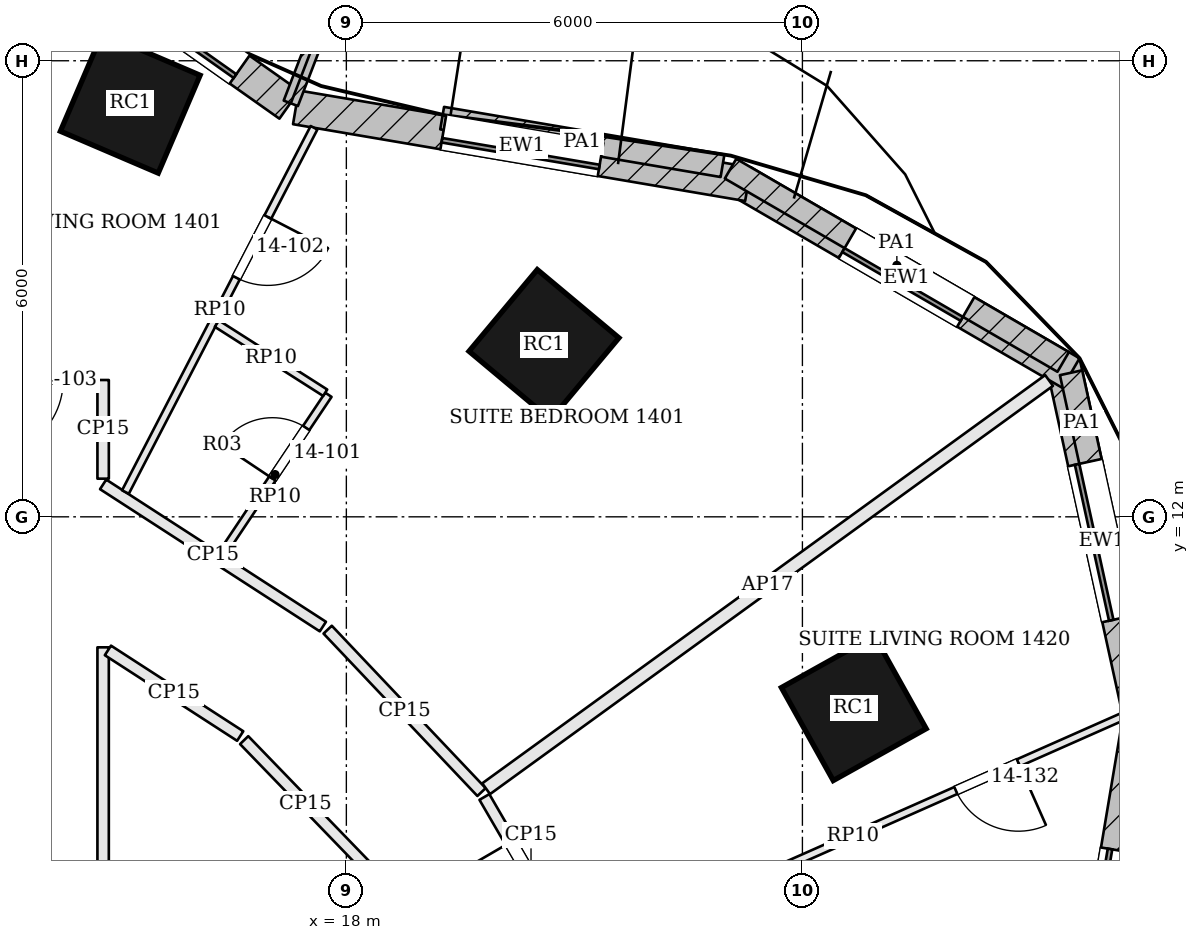
"""IFC4 building model, lengths in metres.
Left out: names, types, materials, properties, quantities, classifications, styles, units other than length and angle.
Written with IfcOpenShell. Run it as: python <this file> out.ifc"""

import sys

from ifc_helpers import new_model, si_unit, direction, frame, frame_2d, origin, origin_2d, place, context, subcontext, project, spatial, rectangle, extrude, element, fill, save


model = new_model("IFC4")
c1 = context("Model", 3, precision=1e-05, world=origin(), true_north=direction((0.0, 1.0)))
c2 = subcontext(c1, "Body", "Model", "MODEL_VIEW")
j1 = project(units=[si_unit("LENGTHUNIT", "METRE"), si_unit("PLANEANGLEUNIT", "RADIAN")], contexts=[c1])
p1 = place(None, origin())
s1 = spatial("IfcSite", under=j1, at=p1, CompositionType="ELEMENT")
p2 = place(p1, origin())
s2 = spatial("IfcBuilding", under=s1, at=p2, CompositionType="ELEMENT")
p3 = place(p2, frame((0.0, 0.0, 66.3)))
s3 = spatial("IfcBuildingStorey", under=s2, at=p3, CompositionType="ELEMENT", Elevation=66.3)
for number, where, z_axis, x_axis in (
    (1, (24.676, 9.483, 0.0), (0.0, 0.0, 1.0), (-0.487, 0.873, 0.0)),
    (2, (20.6, 14.266, 0.0), (0.0, 0.0, 1.0), (-0.767, 0.641, 0.0)),
    (3, (15.157, 17.441, 0.0), (0.0, 0.0, 1.0), (-0.919, 0.394, 0.0)),
):
    element("IfcColumn", number, at=place(p3, frame(where, z_axis=z_axis, x_axis=x_axis)), inside=s3, PredefinedType="COLUMN", context=c2, shape_type="SweptSolid", body=[
        extrude(rectangle(XDim=1.4, YDim=1.4, at=origin_2d()), origin(), (0.0, 0.0, 1.0), 3.6),
    ])
p4 = place(p3, frame((27.5, 3.732, 0.0), z_axis=(0.0, 0.0, 1.0), x_axis=(0.165174419367, 0.986264371853, 0.0)))
e4 = element("IfcWall", 4, at=p4, inside=s3, PredefinedType="SOLIDWALL", context=c2, shape_type="SweptSolid", body=[
    extrude(rectangle(XDim=5.769, YDim=0.45, at=frame_2d((2.885, 0.0))), origin(), (0.0, 0.0, 1.0), 3.4),
])
p5 = place(p4, frame((1.834, 0.0, 0.9)))
e5 = element("IfcOpeningElement", 5, at=p5, cuts=e4, PredefinedType="OPENING", context=c2, shape_type="SweptSolid", body=[
    extrude(rectangle(XDim=2.1, YDim=2.0, at=frame_2d((1.05, 1.0))), frame((0.0, 0.235, 0.0), z_axis=(0.0, -1.0, 0.0), x_axis=(1.0, 0.0, 0.0)), (0.0, 0.0, 1.0), 0.47),
])
p6 = place(p3, frame((28.456, 9.337, 0.0), z_axis=(0.0, 0.0, 1.0), x_axis=(-0.213878425795, 0.976860286315, 0.0)))
e6 = element("IfcWall", 6, at=p6, inside=s3, PredefinedType="SOLIDWALL", context=c2, shape_type="SweptSolid", body=[
    extrude(rectangle(XDim=4.812, YDim=0.45, at=frame_2d((2.406, 0.0))), origin(), (0.0, 0.0, 1.0), 3.4),
])
p7 = place(p6, frame((1.356, 0.0, 0.9)))
e7 = element("IfcOpeningElement", 7, at=p7, cuts=e6, PredefinedType="OPENING", context=c2, shape_type="SweptSolid", body=[
    extrude(rectangle(XDim=2.1, YDim=2.0, at=frame_2d((1.05, 1.0))), frame((0.0, 0.235, 0.0), z_axis=(0.0, -1.0, 0.0), x_axis=(1.0, 0.0, 0.0)), (0.0, 0.0, 1.0), 0.47),
])
p8 = place(p3, frame((27.533, 13.891, 0.0), z_axis=(0.0, 0.0, 1.0), x_axis=(-0.864657614938, 0.502361631625, 0.0)))
e8 = element("IfcWall", 8, at=p8, inside=s3, PredefinedType="SOLIDWALL", context=c2, shape_type="SweptSolid", body=[
    extrude(rectangle(XDim=5.001, YDim=0.45, at=frame_2d((2.5, 0.0))), origin(), (0.0, 0.0, 1.0), 3.4),
])
p9 = place(p8, frame((1.6, 0.0, 0.9)))
e9 = element("IfcOpeningElement", 9, at=p9, cuts=e8, PredefinedType="OPENING", context=c2, shape_type="SweptSolid", body=[
    extrude(rectangle(XDim=1.8, YDim=2.0, at=frame_2d((0.9, 1.0))), frame((0.0, 0.235, 0.0), z_axis=(0.0, -1.0, 0.0), x_axis=(1.0, 0.0, 0.0)), (0.0, 0.0, 1.0), 0.47),
])
p10 = place(p3, frame((23.284, 16.376, 0.0), z_axis=(0.0, 0.0, 1.0), x_axis=(-0.985861729428, 0.167560885797, 0.0)))
e10 = element("IfcWall", 10, at=p10, inside=s3, PredefinedType="SOLIDWALL", context=c2, shape_type="SweptSolid", body=[
    extrude(rectangle(XDim=6.033, YDim=0.45, at=frame_2d((3.017, 0.0))), origin(), (0.0, 0.0, 1.0), 3.4),
])
p11 = place(p10, frame((1.967, 0.0, 0.9)))
e11 = element("IfcOpeningElement", 11, at=p11, cuts=e10, PredefinedType="OPENING", context=c2, shape_type="SweptSolid", body=[
    extrude(rectangle(XDim=2.1, YDim=2.0, at=frame_2d((1.05, 1.0))), frame((0.0, 0.235, 0.0), z_axis=(0.0, -1.0, 0.0), x_axis=(1.0, 0.0, 0.0)), (0.0, 0.0, 1.0), 0.47),
])
p12 = place(p3, frame((17.249, 17.422, 0.0), z_axis=(0.0, 0.0, 1.0), x_axis=(-0.816589291225, 0.577219134694, 0.0)))
e12 = element("IfcWall", 12, at=p12, inside=s3, PredefinedType="SOLIDWALL", context=c2, shape_type="SweptSolid", body=[
    extrude(rectangle(XDim=3.701, YDim=0.45, at=frame_2d((1.851, 0.0))), origin(), (0.0, 0.0, 1.0), 3.4),
])
p13 = place(p12, frame((0.801, 0.0, 0.9)))
e13 = element("IfcOpeningElement", 13, at=p13, cuts=e12, PredefinedType="OPENING", context=c2, shape_type="SweptSolid", body=[
    extrude(rectangle(XDim=2.1, YDim=2.0, at=frame_2d((1.05, 1.0))), frame((0.0, 0.235, 0.0), z_axis=(0.0, -1.0, 0.0), x_axis=(1.0, 0.0, 0.0)), (0.0, 0.0, 1.0), 0.47),
])
p14 = place(p3, frame((17.269, 17.44, 0.0), z_axis=(0.0, 0.0, 1.0), x_axis=(0.359381039836, 0.933190906624, 0.0)))
e14 = element("IfcWall", 14, at=p14, inside=s3, PredefinedType="SOLIDWALL", context=c2, shape_type="SweptSolid", body=[
    extrude(rectangle(XDim=1.75, YDim=0.2, at=frame_2d((0.875, 0.0))), origin(), (0.0, 0.0, 1.0), 3.4),
])
p15 = place(p3, frame((27.823, 12.577, 3.6), z_axis=(0.0, 0.0, 1.0), x_axis=(-0.213826357694, 0.976871684898, 0.0)))
e15 = element("IfcWall", 15, at=p15, inside=s3, PredefinedType="PARAPET", context=c2, shape_type="SweptSolid", body=[
    extrude(rectangle(XDim=1.35, YDim=0.3, at=frame_2d((0.675, 0.0))), origin(), (0.0, 0.0, 1.0), 1.1),
])
p16 = place(p3, frame((27.431, 14.038, 3.6), z_axis=(0.0, 0.0, 1.0), x_axis=(-0.864664590165, 0.502349625773, 0.0)))
e16 = element("IfcWall", 16, at=p16, inside=s3, PredefinedType="PARAPET", context=c2, shape_type="SweptSolid", body=[
    extrude(rectangle(XDim=5.061, YDim=0.3, at=frame_2d((2.531, 0.0))), origin(), (0.0, 0.0, 1.0), 1.1),
])
p17 = place(p3, frame((22.949, 16.618, 3.6), z_axis=(0.0, 0.0, 1.0), x_axis=(-0.985859727788, 0.167572662229, 0.0)))
e17 = element("IfcWall", 17, at=p17, inside=s3, PredefinedType="PARAPET", context=c2, shape_type="SweptSolid", body=[
    extrude(rectangle(XDim=3.741, YDim=0.3, at=frame_2d((1.871, 0.0))), origin(), (0.0, 0.0, 1.0), 1.1),
])
p18 = place(p3, frame((19.778, 8.379, 0.0), z_axis=(0.0, 0.0, 1.0), x_axis=(-0.687769957484, 0.725928705578, 0.0)))
e18 = element("IfcWall", 18, at=p18, inside=s3, PredefinedType="PARTITIONING", context=c2, shape_type="SweptSolid", body=[
    extrude(rectangle(XDim=2.943, YDim=0.15, at=frame_2d((1.472, 0.0))), origin(), (0.0, 0.0, 1.0), 2.68),
])
p19 = place(p3, frame((17.691, 10.556, 0.0), z_axis=(0.0, 0.0, 1.0), x_axis=(-0.839564450265, 0.54326009779, 0.0)))
e19 = element("IfcWall", 19, at=p19, inside=s3, PredefinedType="PARTITIONING", context=c2, shape_type="SweptSolid", body=[
    extrude(rectangle(XDim=3.443, YDim=0.15, at=frame_2d((1.722, 0.0))), origin(), (0.0, 0.0, 1.0), 2.68),
])
p20 = place(p3, frame((14.8, 12.502, 0.0), z_axis=(0.0, 0.0, 1.0), x_axis=(-0.000188040613, 0.99999998232, 0.0)))
e20 = element("IfcWall", 20, at=p20, inside=s3, PredefinedType="PARTITIONING", context=c2, shape_type="SweptSolid", body=[
    extrude(rectangle(XDim=1.298, YDim=0.15, at=frame_2d((0.649, 0.0))), origin(), (0.0, 0.0, 1.0), 2.68),
])
p21 = place(p3, frame((14.725, 13.8, 0.0), z_axis=(0.0, 0.0, 1.0), x_axis=(-1.0, 0.0, 0.0)))
e21 = element("IfcWall", 21, at=p21, inside=s3, PredefinedType="PARTITIONING", context=c2, shape_type="SweptSolid", body=[
    extrude(rectangle(XDim=2.61, YDim=0.15, at=frame_2d((1.305, 0.0))), origin(), (0.0, 0.0, 1.0), 2.68),
])
p22 = place(p21, frame((0.45, 0.0, 0.0)))
e22 = element("IfcOpeningElement", 22, at=p22, cuts=e21, PredefinedType="OPENING", context=c2, shape_type="SweptSolid", body=[
    extrude(rectangle(XDim=1.0, YDim=2.1, at=frame_2d((0.5, 1.05))), frame((0.0, 0.085, 0.0), z_axis=(0.0, -1.0, 0.0), x_axis=(1.0, 0.0, 0.0)), (0.0, 0.0, 1.0), 0.17),
])
p23 = place(p3, frame((27.245, 13.794, 0.0), z_axis=(0.0, 0.0, 1.0), x_axis=(-0.809545443227, -0.58705721642, 0.0)))
e23 = element("IfcWall", 23, at=p23, inside=s3, PredefinedType="PARTITIONING", context=c2, shape_type="SweptSolid", body=[
    extrude(rectangle(XDim=9.148, YDim=0.175, at=frame_2d((4.574, 0.0))), origin(), (0.0, 0.0, 1.0), 2.68),
])
p24 = place(p3, frame((21.043, 6.202, 0.0), z_axis=(0.0, 0.0, 1.0), x_axis=(-0.502422412937, 0.864622298451, 0.0)))
e24 = element("IfcWall", 24, at=p24, inside=s3, PredefinedType="PARTITIONING", context=c2, shape_type="SweptSolid", body=[
    extrude(rectangle(XDim=2.443, YDim=0.15, at=frame_2d((1.221, 0.0))), origin(), (0.0, 0.0, 1.0), 2.68),
])
p25 = place(p24, frame((0.756, 0.0, 0.0)))
e25 = element("IfcOpeningElement", 25, at=p25, cuts=e24, PredefinedType="OPENING", context=c2, shape_type="SweptSolid", body=[
    extrude(rectangle(XDim=1.0, YDim=2.1, at=frame_2d((0.5, 1.05))), frame((0.0, 0.085, 0.0), z_axis=(0.0, -1.0, 0.0), x_axis=(1.0, 0.0, 0.0)), (0.0, 0.0, 1.0), 0.17),
])
p26 = place(p3, frame((14.8, -4.725, 0.0), z_axis=(0.0, 0.0, 1.0), x_axis=(0.0, 1.0, 0.0)))
e26 = element("IfcWall", 26, at=p26, inside=s3, PredefinedType="PARTITIONING", context=c2, shape_type="SweptSolid", body=[
    extrude(rectangle(XDim=15.008, YDim=0.15, at=frame_2d((7.504, 0.0))), origin(), (0.0, 0.0, 1.0), 2.68),
])
p27 = place(p26, frame((9.366, 0.0, 0.0)))
e27 = element("IfcOpeningElement", 27, at=p27, cuts=e26, PredefinedType="OPENING", context=c2, shape_type="SweptSolid", body=[
    extrude(rectangle(XDim=1.0, YDim=2.1, at=frame_2d((0.5, 1.05))), frame((0.0, 0.085, 0.0), z_axis=(0.0, -1.0, 0.0), x_axis=(1.0, 0.0, 0.0)), (0.0, 0.0, 1.0), 0.17),
])
p28 = place(p3, frame((14.863, 10.242, 0.0), z_axis=(0.0, 0.0, 1.0), x_axis=(0.839563837869, -0.543261044198, 0.0)))
e28 = element("IfcWall", 28, at=p28, inside=s3, PredefinedType="PARTITIONING", context=c2, shape_type="SweptSolid", body=[
    extrude(rectangle(XDim=2.073, YDim=0.15, at=frame_2d((1.037, 0.0))), origin(), (0.0, 0.0, 1.0), 2.68),
])
p29 = place(p3, frame((16.656, 9.062, 0.0), z_axis=(0.0, 0.0, 1.0), x_axis=(0.695225115827, -0.718792068906, 0.0)))
e29 = element("IfcWall", 29, at=p29, inside=s3, PredefinedType="PARTITIONING", context=c2, shape_type="SweptSolid", body=[
    extrude(rectangle(XDim=2.321, YDim=0.15, at=frame_2d((1.16, 0.0))), origin(), (0.0, 0.0, 1.0), 2.68),
])
p30 = place(p3, frame((17.575, 17.118, 0.0), z_axis=(0.0, 0.0, 1.0), x_axis=(-0.459763790059, -0.88804124755, 0.0)))
e30 = element("IfcWall", 30, at=p30, inside=s3, PredefinedType="PARTITIONING", context=c2, shape_type="SweptSolid", body=[
    extrude(rectangle(XDim=5.397, YDim=0.1, at=frame_2d((2.698, 0.0))), origin(), (0.0, 0.0, 1.0), 2.68),
])
p31 = place(p30, frame((1.322, 0.0, 0.0)))
e31 = element("IfcOpeningElement", 31, at=p31, cuts=e30, PredefinedType="OPENING", context=c2, shape_type="SweptSolid", body=[
    extrude(rectangle(XDim=0.9, YDim=2.4, at=frame_2d((0.45, 1.2))), frame((0.0, 0.06, 0.0), z_axis=(0.0, -1.0, 0.0), x_axis=(1.0, 0.0, 0.0)), (0.0, 0.0, 1.0), 0.12),
])
p32 = place(p3, frame((16.36, 11.507, 0.0), z_axis=(0.0, 0.0, 1.0), x_axis=(0.555949061639, 0.831216362245, 0.0)))
e32 = element("IfcWall", 32, at=p32, inside=s3, PredefinedType="PARTITIONING", context=c2, shape_type="SweptSolid", body=[
    extrude(rectangle(XDim=2.525, YDim=0.1, at=frame_2d((1.263, 0.0))), origin(), (0.0, 0.0, 1.0), 2.68),
])
p33 = place(p32, frame((1.2, 0.0, 0.0)))
e33 = element("IfcOpeningElement", 33, at=p33, cuts=e32, PredefinedType="OPENING", context=c2, shape_type="SweptSolid", body=[
    extrude(rectangle(XDim=0.8, YDim=2.1, at=frame_2d((0.4, 1.05))), frame((0.0, 0.06, 0.0), z_axis=(0.0, -1.0, 0.0), x_axis=(1.0, 0.0, 0.0)), (0.0, 0.0, 1.0), 0.12),
])
p34 = place(p3, frame((17.722, 13.633, 0.0), z_axis=(0.0, 0.0, 1.0), x_axis=(-0.84310195877, 0.537753742077, 0.0)))
e34 = element("IfcWall", 34, at=p34, inside=s3, PredefinedType="PARTITIONING", context=c2, shape_type="SweptSolid", body=[
    extrude(rectangle(XDim=1.69, YDim=0.1, at=frame_2d((0.845, 0.0))), origin(), (0.0, 0.0, 1.0), 2.68),
])
p35 = place(p3, frame((28.213, 9.371, 0.0), z_axis=(0.0, 0.0, 1.0), x_axis=(-0.914345064768, -0.404935923986, 0.0)))
e35 = element("IfcWall", 35, at=p35, inside=s3, PredefinedType="PARTITIONING", context=c2, shape_type="SweptSolid", body=[
    extrude(rectangle(XDim=7.763, YDim=0.1, at=frame_2d((3.882, 0.0))), origin(), (0.0, 0.0, 1.0), 2.68),
])
p36 = place(p35, frame((1.5, 0.0, 0.0)))
e36 = element("IfcOpeningElement", 36, at=p36, cuts=e35, PredefinedType="OPENING", context=c2, shape_type="SweptSolid", body=[
    extrude(rectangle(XDim=0.9, YDim=2.4, at=frame_2d((0.45, 1.2))), frame((0.0, 0.06, 0.0), z_axis=(0.0, -1.0, 0.0), x_axis=(1.0, 0.0, 0.0)), (0.0, 0.0, 1.0), 0.12),
])
p37 = place(p5, origin())
e37 = element("IfcWindow", 37, at=p37, inside=s3, PartitioningType="SINGLE_PANEL", PredefinedType="WINDOW", context=c2, shape_type="SweptSolid", body=[
    extrude(rectangle(XDim=2.1, YDim=2.0, at=frame_2d((1.05, 1.0))), frame((0.0, 0.135, 0.0), z_axis=(0.0, -1.0, 0.0), x_axis=(1.0, 0.0, 0.0)), (0.0, 0.0, 1.0), 0.06),
])
fill(e5, e37)
p38 = place(p7, origin())
e38 = element("IfcWindow", 38, at=p38, inside=s3, PartitioningType="SINGLE_PANEL", PredefinedType="WINDOW", context=c2, shape_type="SweptSolid", body=[
    extrude(rectangle(XDim=2.1, YDim=2.0, at=frame_2d((1.05, 1.0))), frame((0.0, 0.135, 0.0), z_axis=(0.0, -1.0, 0.0), x_axis=(1.0, 0.0, 0.0)), (0.0, 0.0, 1.0), 0.06),
])
fill(e7, e38)
p39 = place(p9, origin())
e39 = element("IfcWindow", 39, at=p39, inside=s3, PartitioningType="SINGLE_PANEL", PredefinedType="WINDOW", context=c2, shape_type="SweptSolid", body=[
    extrude(rectangle(XDim=1.8, YDim=2.0, at=frame_2d((0.9, 1.0))), frame((0.0, 0.135, 0.0), z_axis=(0.0, -1.0, 0.0), x_axis=(1.0, 0.0, 0.0)), (0.0, 0.0, 1.0), 0.06),
])
fill(e9, e39)
p40 = place(p11, origin())
e40 = element("IfcWindow", 40, at=p40, inside=s3, PartitioningType="SINGLE_PANEL", PredefinedType="WINDOW", context=c2, shape_type="SweptSolid", body=[
    extrude(rectangle(XDim=2.1, YDim=2.0, at=frame_2d((1.05, 1.0))), frame((0.0, 0.135, 0.0), z_axis=(0.0, -1.0, 0.0), x_axis=(1.0, 0.0, 0.0)), (0.0, 0.0, 1.0), 0.06),
])
fill(e11, e40)
p41 = place(p13, origin())
e41 = element("IfcWindow", 41, at=p41, inside=s3, PartitioningType="SINGLE_PANEL", PredefinedType="WINDOW", context=c2, shape_type="SweptSolid", body=[
    extrude(rectangle(XDim=2.1, YDim=2.0, at=frame_2d((1.05, 1.0))), frame((0.0, 0.135, 0.0), z_axis=(0.0, -1.0, 0.0), x_axis=(1.0, 0.0, 0.0)), (0.0, 0.0, 1.0), 0.06),
])
fill(e13, e41)
p42 = place(p33, origin())
e42 = element("IfcDoor", 42, at=p42, inside=s3, OperationType="SINGLE_SWING_LEFT", PredefinedType="DOOR", context=c2, shape_type="SweptSolid", body=[
    extrude(rectangle(XDim=0.8, YDim=2.1, at=frame_2d((0.4, 1.05))), frame((0.0, 0.025, 0.0), z_axis=(0.0, -1.0, 0.0), x_axis=(1.0, 0.0, 0.0)), (0.0, 0.0, 1.0), 0.05),
])
fill(e33, e42)
p43 = place(p31, origin())
e43 = element("IfcDoor", 43, at=p43, inside=s3, OperationType="SINGLE_SWING_LEFT", PredefinedType="DOOR", context=c2, shape_type="SweptSolid", body=[
    extrude(rectangle(XDim=0.9, YDim=2.4, at=frame_2d((0.45, 1.2))), frame((0.0, 0.025, 0.0), z_axis=(0.0, -1.0, 0.0), x_axis=(1.0, 0.0, 0.0)), (0.0, 0.0, 1.0), 0.05),
])
fill(e31, e43)
p44 = place(p22, origin())
e44 = element("IfcDoor", 44, at=p44, inside=s3, OperationType="SINGLE_SWING_RIGHT", PredefinedType="DOOR", context=c2, shape_type="SweptSolid", body=[
    extrude(rectangle(XDim=1.0, YDim=2.1, at=frame_2d((0.5, 1.05))), frame((0.0, 0.025, 0.0), z_axis=(0.0, -1.0, 0.0), x_axis=(1.0, 0.0, 0.0)), (0.0, 0.0, 1.0), 0.05),
])
fill(e22, e44)
p45 = place(p36, origin())
e45 = element("IfcDoor", 45, at=p45, inside=s3, OperationType="SINGLE_SWING_LEFT", PredefinedType="DOOR", context=c2, shape_type="SweptSolid", body=[
    extrude(rectangle(XDim=0.9, YDim=2.4, at=frame_2d((0.45, 1.2))), frame((0.0, 0.025, 0.0), z_axis=(0.0, -1.0, 0.0), x_axis=(1.0, 0.0, 0.0)), (0.0, 0.0, 1.0), 0.05),
])
fill(e36, e45)
p46 = place(p25, origin())
e46 = element("IfcDoor", 46, at=p46, inside=s3, OperationType="SINGLE_SWING_RIGHT", PredefinedType="DOOR", context=c2, shape_type="SweptSolid", body=[
    extrude(rectangle(XDim=1.0, YDim=2.1, at=frame_2d((0.5, 1.05))), frame((0.0, 0.025, 0.0), z_axis=(0.0, -1.0, 0.0), x_axis=(1.0, 0.0, 0.0)), (0.0, 0.0, 1.0), 0.05),
])
fill(e25, e46)
save(model, sys.argv[1])
